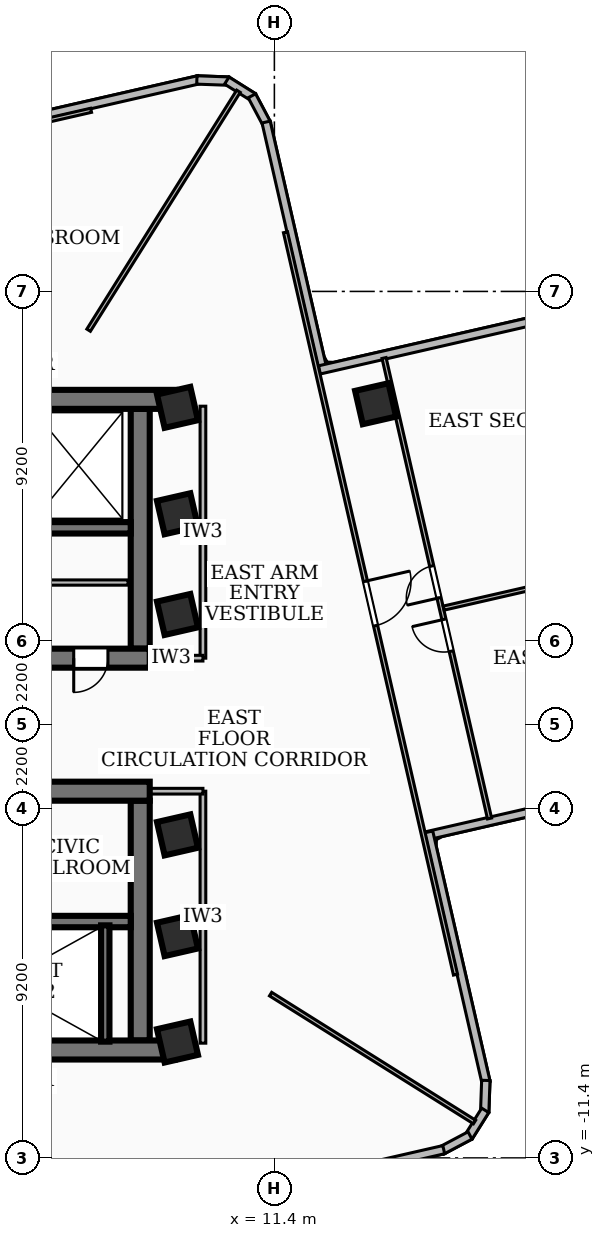
"""IFC4 building model, lengths in metres.
Left out: names, types, materials, properties, quantities, classifications, styles, units other than length and angle.
Written with IfcOpenShell. Run it as: python <this file> out.ifc"""

import sys

from ifc_helpers import new_model, si_unit, direction, frame, frame_2d, origin, origin_2d, place, context, subcontext, project, spatial, rectangle, extrude, element, fill, save


model = new_model("IFC4")
c1 = context("Model", 3, precision=1e-05, world=origin(), true_north=direction((0.0, 1.0)))
c2 = subcontext(c1, "Body", "Model", "MODEL_VIEW")
j1 = project(units=[si_unit("LENGTHUNIT", "METRE"), si_unit("PLANEANGLEUNIT", "RADIAN")], contexts=[c1])
p1 = place(None, origin())
s1 = spatial("IfcSite", under=j1, at=p1, CompositionType="ELEMENT")
p2 = place(p1, origin())
s2 = spatial("IfcBuilding", under=s1, at=p2, CompositionType="ELEMENT")
p3 = place(p2, frame((0.0, 0.0, 119.88)))
s3 = spatial("IfcBuildingStorey", under=s2, at=p3, CompositionType="ELEMENT", Elevation=119.88)
p4 = place(p3, frame((-8.78, 8.56, 0.0), z_axis=(0.0, 0.0, 1.0), x_axis=(1.0, 0.0, 0.0)))
e1 = element("IfcWall", 1, at=p4, inside=s3, PredefinedType="SHEAR", context=c2, shape_type="SweptSolid", body=[
    extrude(rectangle(XDim=17.56, YDim=0.5, at=frame_2d((8.78, 0.0))), origin(), (0.0, 0.0, 1.0), 3.34),
])
p5 = place(p3, frame((8.12, 1.75, 0.0), z_axis=(0.0, 0.0, 1.0), x_axis=(-1.0, 0.0, 0.0)))
e2 = element("IfcWall", 2, at=p5, inside=s3, PredefinedType="SHEAR", context=c2, shape_type="SweptSolid", body=[
    extrude(rectangle(XDim=16.24, YDim=0.5, at=frame_2d((8.12, 0.0))), origin(), (0.0, 0.0, 1.0), 3.34),
])
p6 = place(p5, frame((7.45, 0.0, 0.0)))
e3 = element("IfcOpeningElement", 3, at=p6, cuts=e2, PredefinedType="OPENING", context=c2, shape_type="SweptSolid", body=[
    extrude(rectangle(XDim=1.0, YDim=2.1, at=frame_2d((0.5, 1.05))), frame((0.0, 0.26, 0.0), z_axis=(0.0, -1.0, 0.0), x_axis=(1.0, 0.0, 0.0)), (0.0, 0.0, 1.0), 0.52),
])
p7 = place(p5, frame((3.4, 0.0, 0.0)))
e4 = element("IfcOpeningElement", 4, at=p7, cuts=e2, PredefinedType="OPENING", context=c2, shape_type="SweptSolid", body=[
    extrude(rectangle(XDim=0.9, YDim=2.06, at=frame_2d((0.45, 1.03))), frame((0.0, 0.26, 0.0), z_axis=(0.0, -1.0, 0.0), x_axis=(1.0, 0.0, 0.0)), (0.0, 0.0, 1.0), 0.52),
])
p8 = place(p5, frame((1.1, 0.0, 0.0)))
e5 = element("IfcOpeningElement", 5, at=p8, cuts=e2, PredefinedType="OPENING", context=c2, shape_type="SweptSolid", body=[
    extrude(rectangle(XDim=0.9, YDim=2.06, at=frame_2d((0.45, 1.03))), frame((0.0, 0.26, 0.0), z_axis=(0.0, -1.0, 0.0), x_axis=(1.0, 0.0, 0.0)), (0.0, 0.0, 1.0), 0.52),
])
p9 = place(p3, frame((7.87, 8.31, 0.0), z_axis=(0.0, 0.0, 1.0), x_axis=(0.0, -1.0, 0.0)))
e6 = element("IfcWall", 6, at=p9, inside=s3, PredefinedType="SHEAR", context=c2, shape_type="SweptSolid", body=[
    extrude(rectangle(XDim=6.31, YDim=0.5, at=frame_2d((3.155, 0.0))), origin(), (0.0, 0.0, 1.0), 3.34),
])
p10 = place(p3, frame((7.62, 5.18, 0.0), z_axis=(0.0, 0.0, 1.0), x_axis=(-1.0, 0.0, 0.0)))
e7 = element("IfcWall", 7, at=p10, inside=s3, PredefinedType="SOLIDWALL", context=c2, shape_type="SweptSolid", body=[
    extrude(rectangle(XDim=15.24, YDim=0.3, at=frame_2d((7.62, 0.0))), origin(), (0.0, 0.0, 1.0), 3.34),
])
p11 = place(p10, frame((5.77, 0.0, 0.0)))
e8 = element("IfcOpeningElement", 8, at=p11, cuts=e7, PredefinedType="OPENING", context=c2, shape_type="SweptSolid", body=[
    extrude(rectangle(XDim=1.1, YDim=2.15, at=frame_2d((0.55, 1.075))), frame((0.0, 0.16, 0.0), z_axis=(0.0, -1.0, 0.0), x_axis=(1.0, 0.0, 0.0)), (0.0, 0.0, 1.0), 0.32),
])
p12 = place(p10, frame((2.97, 0.0, 0.0)))
e9 = element("IfcOpeningElement", 9, at=p12, cuts=e7, PredefinedType="OPENING", context=c2, shape_type="SweptSolid", body=[
    extrude(rectangle(XDim=1.1, YDim=2.15, at=frame_2d((0.55, 1.075))), frame((0.0, 0.16, 0.0), z_axis=(0.0, -1.0, 0.0), x_axis=(1.0, 0.0, 0.0)), (0.0, 0.0, 1.0), 0.32),
])
p13 = place(p10, frame((7.97, 0.0, 0.0)))
e10 = element("IfcOpeningElement", 10, at=p13, cuts=e7, PredefinedType="OPENING", context=c2, shape_type="SweptSolid", body=[
    extrude(rectangle(XDim=1.0, YDim=2.1, at=frame_2d((0.5, 1.05))), frame((0.0, 0.16, 0.0), z_axis=(0.0, -1.0, 0.0), x_axis=(1.0, 0.0, 0.0)), (0.0, 0.0, 1.0), 0.32),
])
p14 = place(p3, frame((8.78, -8.56, 0.0), z_axis=(0.0, 0.0, 1.0), x_axis=(-1.0, 0.0, 0.0)))
e11 = element("IfcWall", 11, at=p14, inside=s3, PredefinedType="SHEAR", context=c2, shape_type="SweptSolid", body=[
    extrude(rectangle(XDim=17.56, YDim=0.5, at=frame_2d((8.78, 0.0))), origin(), (0.0, 0.0, 1.0), 3.34),
])
p15 = place(p3, frame((-8.12, -1.75, 0.0), z_axis=(0.0, 0.0, 1.0), x_axis=(1.0, 0.0, 0.0)))
e12 = element("IfcWall", 12, at=p15, inside=s3, PredefinedType="SHEAR", context=c2, shape_type="SweptSolid", body=[
    extrude(rectangle(XDim=16.24, YDim=0.5, at=frame_2d((8.12, 0.0))), origin(), (0.0, 0.0, 1.0), 3.34),
])
p16 = place(p15, frame((7.45, 0.0, 0.0)))
e13 = element("IfcOpeningElement", 13, at=p16, cuts=e12, PredefinedType="OPENING", context=c2, shape_type="SweptSolid", body=[
    extrude(rectangle(XDim=1.0, YDim=2.1, at=frame_2d((0.5, 1.05))), frame((0.0, 0.26, 0.0), z_axis=(0.0, -1.0, 0.0), x_axis=(1.0, 0.0, 0.0)), (0.0, 0.0, 1.0), 0.52),
])
p17 = place(p15, frame((12.65, 0.0, 0.0)))
e14 = element("IfcOpeningElement", 14, at=p17, cuts=e12, PredefinedType="OPENING", context=c2, shape_type="SweptSolid", body=[
    extrude(rectangle(XDim=0.9, YDim=2.06, at=frame_2d((0.45, 1.03))), frame((0.0, 0.26, 0.0), z_axis=(0.0, -1.0, 0.0), x_axis=(1.0, 0.0, 0.0)), (0.0, 0.0, 1.0), 0.52),
])
p18 = place(p15, frame((0.565, 0.0, 0.0)))
e15 = element("IfcOpeningElement", 15, at=p18, cuts=e12, PredefinedType="OPENING", context=c2, shape_type="SweptSolid", body=[
    extrude(rectangle(XDim=1.05, YDim=2.15, at=frame_2d((0.525, 1.075))), frame((0.0, 0.26, 0.0), z_axis=(0.0, -1.0, 0.0), x_axis=(1.0, 0.0, 0.0)), (0.0, 0.0, 1.0), 0.52),
])
p19 = place(p15, frame((2.125, 0.0, 0.0)))
e16 = element("IfcOpeningElement", 16, at=p19, cuts=e12, PredefinedType="OPENING", context=c2, shape_type="SweptSolid", body=[
    extrude(rectangle(XDim=1.05, YDim=2.15, at=frame_2d((0.525, 1.075))), frame((0.0, 0.26, 0.0), z_axis=(0.0, -1.0, 0.0), x_axis=(1.0, 0.0, 0.0)), (0.0, 0.0, 1.0), 0.52),
])
p20 = place(p15, frame((3.685, 0.0, 0.0)))
e17 = element("IfcOpeningElement", 17, at=p20, cuts=e12, PredefinedType="OPENING", context=c2, shape_type="SweptSolid", body=[
    extrude(rectangle(XDim=1.05, YDim=2.15, at=frame_2d((0.525, 1.075))), frame((0.0, 0.26, 0.0), z_axis=(0.0, -1.0, 0.0), x_axis=(1.0, 0.0, 0.0)), (0.0, 0.0, 1.0), 0.52),
])
p21 = place(p3, frame((7.87, -2.0, 0.0), z_axis=(0.0, 0.0, 1.0), x_axis=(0.0, -1.0, 0.0)))
e18 = element("IfcWall", 18, at=p21, inside=s3, PredefinedType="SHEAR", context=c2, shape_type="SweptSolid", body=[
    extrude(rectangle(XDim=6.31, YDim=0.5, at=frame_2d((3.155, 0.0))), origin(), (0.0, 0.0, 1.0), 3.34),
])
p22 = place(p3, frame((-7.62, -5.18, 0.0), z_axis=(0.0, 0.0, 1.0), x_axis=(1.0, 0.0, 0.0)))
e19 = element("IfcWall", 19, at=p22, inside=s3, PredefinedType="SOLIDWALL", context=c2, shape_type="SweptSolid", body=[
    extrude(rectangle(XDim=15.24, YDim=0.3, at=frame_2d((7.62, 0.0))), origin(), (0.0, 0.0, 1.0), 3.34),
])
p23 = place(p22, frame((5.77, 0.0, 0.0)))
e20 = element("IfcOpeningElement", 20, at=p23, cuts=e19, PredefinedType="OPENING", context=c2, shape_type="SweptSolid", body=[
    extrude(rectangle(XDim=1.1, YDim=2.15, at=frame_2d((0.55, 1.075))), frame((0.0, 0.16, 0.0), z_axis=(0.0, -1.0, 0.0), x_axis=(1.0, 0.0, 0.0)), (0.0, 0.0, 1.0), 0.32),
])
p24 = place(p22, frame((7.97, 0.0, 0.0)))
e21 = element("IfcOpeningElement", 21, at=p24, cuts=e19, PredefinedType="OPENING", context=c2, shape_type="SweptSolid", body=[
    extrude(rectangle(XDim=1.0, YDim=2.1, at=frame_2d((0.5, 1.05))), frame((0.0, 0.16, 0.0), z_axis=(0.0, -1.0, 0.0), x_axis=(1.0, 0.0, 0.0)), (0.0, 0.0, 1.0), 0.32),
])
p25 = place(p3, frame((6.95, -8.34, 0.0), z_axis=(0.0, 0.0, 1.0), x_axis=(0.0, 1.0, 0.0)))
e22 = element("IfcWall", 22, at=p25, inside=s3, PredefinedType="SOLIDWALL", context=c2, shape_type="SweptSolid", body=[
    extrude(rectangle(XDim=3.06, YDim=0.22, at=frame_2d((1.53, 0.0))), origin(), (0.0, 0.0, 1.0), 3.34),
])
for number, where, z_axis, x_axis in (
    (23, (8.85, -5.55, 0.0), (0.0, 0.0, 1.0), (0.975, 0.223, 0.0)),
    (24, (8.85, -2.9, 0.0), (0.0, 0.0, 1.0), (0.975, 0.223, 0.0)),
    (25, (8.85, 2.9, 0.0), (0.0, 0.0, 1.0), (0.975, 0.223, 0.0)),
    (26, (8.85, 5.55, 0.0), (0.0, 0.0, 1.0), (0.975, 0.223, 0.0)),
    (27, (8.85, -8.35, 0.0), (0.0, 0.0, 1.0), (0.975, 0.223, 0.0)),
    (28, (8.85, 8.35, 0.0), (0.0, 0.0, 1.0), (0.975, 0.223, 0.0)),
    (29, (14.064, 8.445, 0.0), (0.0, 0.0, 1.0), (0.975, 0.223, 0.0)),
):
    element("IfcColumn", number, at=place(p3, frame(where, z_axis=z_axis, x_axis=x_axis)), inside=s3, PredefinedType="COLUMN", context=c2, shape_type="SweptSolid", body=[
        extrude(rectangle(XDim=0.9, YDim=0.9, at=origin_2d()), origin(), (0.0, 0.0, 1.0), 3.6),
    ])
p26 = place(p3, frame((2.821, 15.46, 0.0), z_axis=(0.0, 0.0, 1.0), x_axis=(0.974754598481, 0.223278912438, 0.0)))
e30 = element("IfcWall", 30, at=p26, inside=s3, PredefinedType="SOLIDWALL", context=c2, shape_type="SweptSolid", body=[
    extrude(rectangle(XDim=6.759, YDim=0.22, at=frame_2d((3.379, 0.0))), origin(), (0.0, 0.0, 1.0), 2.57),
])
p27 = place(p3, frame((9.36, 16.964, 0.0), z_axis=(0.0, 0.0, 1.0), x_axis=(0.999352376715, -0.035983706773, 0.0)))
e31 = element("IfcWall", 31, at=p27, inside=s3, PredefinedType="SOLIDWALL", context=c2, shape_type="SweptSolid", body=[
    extrude(rectangle(XDim=0.834, YDim=0.22, at=frame_2d((0.417, 0.0))), origin(), (0.0, 0.0, 1.0), 3.34),
])
p28 = place(p3, frame((10.148, 16.948, 0.0), z_axis=(0.0, 0.0, 1.0), x_axis=(0.847311109497, -0.531096868492, 0.0)))
e32 = element("IfcWall", 32, at=p28, inside=s3, PredefinedType="SOLIDWALL", context=c2, shape_type="SweptSolid", body=[
    extrude(rectangle(XDim=0.819, YDim=0.22, at=frame_2d((0.41, 0.0))), origin(), (0.0, 0.0, 1.0), 3.34),
])
p29 = place(p3, frame((10.809, 16.548, 0.0), z_axis=(0.0, 0.0, 1.0), x_axis=(0.468506090516, -0.883460266876, 0.0)))
e33 = element("IfcWall", 33, at=p29, inside=s3, PredefinedType="SOLIDWALL", context=c2, shape_type="SweptSolid", body=[
    extrude(rectangle(XDim=0.834, YDim=0.22, at=frame_2d((0.417, 0.0))), origin(), (0.0, 0.0, 1.0), 3.34),
])
p30 = place(p3, frame((11.182, 15.857, 0.0), z_axis=(0.0, 0.0, 1.0), x_axis=(0.223278912438, -0.974754598481, 0.0)))
e34 = element("IfcWall", 34, at=p30, inside=s3, PredefinedType="SOLIDWALL", context=c2, shape_type="SweptSolid", body=[
    extrude(rectangle(XDim=6.759, YDim=0.22, at=frame_2d((3.379, 0.0))), origin(), (0.0, 0.0, 1.0), 3.34),
])
p31 = place(p3, frame((12.585, 9.335, 0.0), z_axis=(0.0, 0.0, 1.0), x_axis=(0.974754036658, 0.223281365141, 0.0)))
e35 = element("IfcWall", 35, at=p31, inside=s3, PredefinedType="SOLIDWALL", context=c2, shape_type="SweptSolid", body=[
    extrude(rectangle(XDim=13.459, YDim=0.22, at=frame_2d((6.729, 0.0))), origin(), (0.0, 0.0, 1.0), 3.34),
])
p32 = place(p31, frame((10.859, 0.0, 0.85)))
e36 = element("IfcOpeningElement", 36, at=p32, cuts=e35, PredefinedType="OPENING", context=c2, shape_type="SweptSolid", body=[
    extrude(rectangle(XDim=1.5, YDim=1.8, at=frame_2d((0.75, 0.9))), frame((0.0, 0.12, 0.0), z_axis=(0.0, -1.0, 0.0), x_axis=(1.0, 0.0, 0.0)), (0.0, 0.0, 1.0), 0.24),
])
p33 = place(p3, frame((28.512, 0.078, 0.0), z_axis=(0.0, 0.0, 1.0), x_axis=(-0.974753462872, -0.223283870038, 0.0)))
e37 = element("IfcWall", 37, at=p33, inside=s3, PredefinedType="SOLIDWALL", context=c2, shape_type="SweptSolid", body=[
    extrude(rectangle(XDim=13.458, YDim=0.22, at=frame_2d((6.729, 0.0))), origin(), (0.0, 0.0, 1.0), 3.34),
])
p34 = place(p33, frame((1.1, 0.0, 0.85)))
e38 = element("IfcOpeningElement", 38, at=p34, cuts=e37, PredefinedType="OPENING", context=c2, shape_type="SweptSolid", body=[
    extrude(rectangle(XDim=2.1, YDim=1.8, at=frame_2d((1.05, 0.9))), frame((0.0, 0.12, 0.0), z_axis=(0.0, -1.0, 0.0), x_axis=(1.0, 0.0, 0.0)), (0.0, 0.0, 1.0), 0.24),
])
p35 = place(p3, frame((15.46, -2.821, 0.0), z_axis=(0.0, 0.0, 1.0), x_axis=(0.223278912438, -0.974754598481, 0.0)))
e39 = element("IfcWall", 39, at=p35, inside=s3, PredefinedType="SOLIDWALL", context=c2, shape_type="SweptSolid", body=[
    extrude(rectangle(XDim=6.759, YDim=0.22, at=frame_2d((3.379, 0.0))), origin(), (0.0, 0.0, 1.0), 3.34),
])
p36 = place(p3, frame((16.964, -9.36, 0.0), z_axis=(0.0, 0.0, 1.0), x_axis=(-0.035983706773, -0.999352376715, 0.0)))
e40 = element("IfcWall", 40, at=p36, inside=s3, PredefinedType="SOLIDWALL", context=c2, shape_type="SweptSolid", body=[
    extrude(rectangle(XDim=0.834, YDim=0.22, at=frame_2d((0.417, 0.0))), origin(), (0.0, 0.0, 1.0), 3.34),
])
p37 = place(p3, frame((16.948, -10.148, 0.0), z_axis=(0.0, 0.0, 1.0), x_axis=(-0.531096868492, -0.847311109497, 0.0)))
e41 = element("IfcWall", 41, at=p37, inside=s3, PredefinedType="SOLIDWALL", context=c2, shape_type="SweptSolid", body=[
    extrude(rectangle(XDim=0.819, YDim=0.22, at=frame_2d((0.41, 0.0))), origin(), (0.0, 0.0, 1.0), 3.34),
])
p38 = place(p3, frame((16.548, -10.809, 0.0), z_axis=(0.0, 0.0, 1.0), x_axis=(-0.883460266876, -0.468506090516, 0.0)))
e42 = element("IfcWall", 42, at=p38, inside=s3, PredefinedType="SOLIDWALL", context=c2, shape_type="SweptSolid", body=[
    extrude(rectangle(XDim=0.834, YDim=0.22, at=frame_2d((0.417, 0.0))), origin(), (0.0, 0.0, 1.0), 3.34),
])
p39 = place(p3, frame((15.857, -11.182, 0.0), z_axis=(0.0, 0.0, 1.0), x_axis=(-0.974754598481, -0.223278912438, 0.0)))
e43 = element("IfcWall", 43, at=p39, inside=s3, PredefinedType="SOLIDWALL", context=c2, shape_type="SweptSolid", body=[
    extrude(rectangle(XDim=6.759, YDim=0.22, at=frame_2d((3.379, 0.0))), origin(), (0.0, 0.0, 1.0), 3.34),
])
p40 = place(p3, frame((2.9, 3.74, 0.0), z_axis=(0.0, 0.0, 1.0), x_axis=(1.0, 0.0, 0.0)))
e44 = element("IfcWall", 44, at=p40, inside=s3, PredefinedType="PARTITIONING", context=c2, shape_type="SweptSolid", body=[
    extrude(rectangle(XDim=4.65, YDim=0.138, at=frame_2d((2.325, 0.0))), origin(), (0.0, 0.0, 1.0), 3.34),
])
p41 = place(p3, frame((9.52, 1.75, 0.0), z_axis=(0.0, 0.0, 1.0), x_axis=(0.0, 1.0, 0.0)))
e45 = element("IfcWall", 45, at=p41, inside=s3, PredefinedType="PARTITIONING", context=c2, shape_type="SweptSolid", body=[
    extrude(rectangle(XDim=6.63, YDim=0.15, at=frame_2d((3.315, 0.0))), origin(), (0.0, 0.0, 1.0), 2.57),
])
p42 = place(p3, frame((7.85, 1.75, 0.0), z_axis=(0.0, 0.0, 1.0), x_axis=(1.0, 0.0, 0.0)))
e46 = element("IfcWall", 46, at=p42, inside=s3, PredefinedType="PARTITIONING", context=c2, shape_type="SweptSolid", body=[
    extrude(rectangle(XDim=1.67, YDim=0.15, at=frame_2d((0.835, 0.0))), origin(), (0.0, 0.0, 1.0), 2.57),
])
p43 = place(p3, frame((9.52, -8.38, 0.0), z_axis=(0.0, 0.0, 1.0), x_axis=(0.0, 1.0, 0.0)))
e47 = element("IfcWall", 47, at=p43, inside=s3, PredefinedType="PARTITIONING", context=c2, shape_type="SweptSolid", body=[
    extrude(rectangle(XDim=6.63, YDim=0.15, at=frame_2d((3.315, 0.0))), origin(), (0.0, 0.0, 1.0), 2.57),
])
p44 = place(p3, frame((7.85, -1.75, 0.0), z_axis=(0.0, 0.0, 1.0), x_axis=(1.0, 0.0, 0.0)))
e48 = element("IfcWall", 48, at=p44, inside=s3, PredefinedType="PARTITIONING", context=c2, shape_type="SweptSolid", body=[
    extrude(rectangle(XDim=1.67, YDim=0.15, at=frame_2d((0.835, 0.0))), origin(), (0.0, 0.0, 1.0), 2.57),
])
p45 = place(p3, frame((6.512, 10.38, 0.0), z_axis=(0.0, 0.0, 1.0), x_axis=(0.531323053356, 0.847169294163, 0.0)))
e49 = element("IfcWall", 49, at=p45, inside=s3, PredefinedType="PARTITIONING", context=c2, shape_type="SweptSolid", body=[
    extrude(rectangle(XDim=7.421, YDim=0.11, at=frame_2d((3.711, 0.0))), origin(), (0.0, 0.0, 1.0), 2.57),
])
p46 = place(p3, frame((11.3, -7.089, 0.0), z_axis=(0.0, 0.0, 1.0), x_axis=(0.847172398776, -0.531318103167, 0.0)))
e50 = element("IfcWall", 50, at=p46, inside=s3, PredefinedType="PARTITIONING", context=c2, shape_type="SweptSolid", body=[
    extrude(rectangle(XDim=6.335, YDim=0.11, at=frame_2d((3.167, 0.0))), origin(), (0.0, 0.0, 1.0), 3.34),
])
p47 = place(p3, frame((11.692, 12.957, 0.0), z_axis=(0.0, 0.0, 1.0), x_axis=(0.223262093598, -0.97475845088, 0.0)))
e51 = element("IfcWall", 51, at=p47, inside=s3, PredefinedType="PARTITIONING", context=c2, shape_type="SweptSolid", body=[
    extrude(rectangle(XDim=20.04, YDim=0.11, at=frame_2d((10.02, 0.0))), origin(), (0.0, 0.0, 1.0), 2.57),
])
p48 = place(p47, frame((9.42, 0.0, 0.0)))
e52 = element("IfcOpeningElement", 52, at=p48, cuts=e51, PredefinedType="OPENING", context=c2, shape_type="SweptSolid", body=[
    extrude(rectangle(XDim=1.2, YDim=2.1, at=frame_2d((0.6, 1.05))), frame((0.0, 0.065, 0.0), z_axis=(0.0, -1.0, 0.0), x_axis=(1.0, 0.0, 0.0)), (0.0, 0.0, 1.0), 0.13),
])
p49 = place(p3, frame((15.855, 3.067, 0.0), z_axis=(0.0, 0.0, 1.0), x_axis=(0.974758398925, 0.223262320434, 0.0)))
e53 = element("IfcWall", 53, at=p49, inside=s3, PredefinedType="PARTITIONING", context=c2, shape_type="SweptSolid", body=[
    extrude(rectangle(XDim=13.075, YDim=0.11, at=frame_2d((6.538, 0.0))), origin(), (0.0, 0.0, 1.0), 2.72),
])
p50 = place(p3, frame((17.062, -2.468, 0.0), z_axis=(0.0, 0.0, 1.0), x_axis=(-0.223341555051, 0.974740247341, 0.0)))
e54 = element("IfcWall", 54, at=p50, inside=s3, PredefinedType="PARTITIONING", context=c2, shape_type="SweptSolid", body=[
    extrude(rectangle(XDim=12.43, YDim=0.11, at=frame_2d((6.215, 0.0))), origin(), (0.0, 0.0, 1.0), 2.57),
])
p51 = place(p50, frame((4.515, 0.0, 0.0)))
e55 = element("IfcOpeningElement", 55, at=p51, cuts=e54, PredefinedType="OPENING", context=c2, shape_type="SweptSolid", body=[
    extrude(rectangle(XDim=0.86, YDim=2.04, at=frame_2d((0.43, 1.02))), frame((0.0, 0.065, 0.0), z_axis=(0.0, -1.0, 0.0), x_axis=(1.0, 0.0, 0.0)), (0.0, 0.0, 1.0), 0.13),
])
p52 = place(p50, frame((5.955, 0.0, 0.0)))
e56 = element("IfcOpeningElement", 56, at=p52, cuts=e54, PredefinedType="OPENING", context=c2, shape_type="SweptSolid", body=[
    extrude(rectangle(XDim=0.86, YDim=2.04, at=frame_2d((0.43, 1.02))), frame((0.0, 0.065, 0.0), z_axis=(0.0, -1.0, 0.0), x_axis=(1.0, 0.0, 0.0)), (0.0, 0.0, 1.0), 0.13),
])
p53 = place(p3, frame((-12.957, 11.692, 0.0), z_axis=(0.0, 0.0, 1.0), x_axis=(0.97475845088, 0.223262093598, 0.0)))
e57 = element("IfcWall", 57, at=p53, inside=s3, PredefinedType="PARTITIONING", context=c2, shape_type="SweptSolid", body=[
    extrude(rectangle(XDim=20.04, YDim=0.11, at=frame_2d((10.02, 0.0))), origin(), (0.0, 0.0, 1.0), 2.57),
])
p54 = place(p53, frame((9.42, 0.0, 0.0)))
e58 = element("IfcOpeningElement", 58, at=p54, cuts=e57, PredefinedType="OPENING", context=c2, shape_type="SweptSolid", body=[
    extrude(rectangle(XDim=1.2, YDim=2.1, at=frame_2d((0.6, 1.05))), frame((0.0, 0.065, 0.0), z_axis=(0.0, -1.0, 0.0), x_axis=(1.0, 0.0, 0.0)), (0.0, 0.0, 1.0), 0.13),
])
p55 = place(p8, origin())
e59 = element("IfcDoor", 59, at=p55, inside=s3, OperationType="SINGLE_SWING_RIGHT", PredefinedType="DOOR", context=c2, shape_type="SweptSolid", body=[
    extrude(rectangle(XDim=0.9, YDim=2.06, at=frame_2d((0.45, 1.03))), frame((0.0, 0.025, 0.0), z_axis=(0.0, -1.0, 0.0), x_axis=(1.0, 0.0, 0.0)), (0.0, 0.0, 1.0), 0.05),
])
fill(e5, e59)
p56 = place(p48, origin())
e60 = element("IfcDoor", 60, at=p56, inside=s3, OperationType="SINGLE_SWING_LEFT", PredefinedType="DOOR", context=c2, shape_type="SweptSolid", body=[
    extrude(rectangle(XDim=1.2, YDim=2.1, at=frame_2d((0.6, 1.05))), frame((0.0, 0.025, 0.0), z_axis=(0.0, -1.0, 0.0), x_axis=(1.0, 0.0, 0.0)), (0.0, 0.0, 1.0), 0.05),
])
fill(e52, e60)
p57 = place(p51, origin())
e61 = element("IfcDoor", 61, at=p57, inside=s3, OperationType="SINGLE_SWING_RIGHT", PredefinedType="DOOR", context=c2, shape_type="SweptSolid", body=[
    extrude(rectangle(XDim=0.86, YDim=2.04, at=frame_2d((0.43, 1.02))), frame((0.0, 0.025, 0.0), z_axis=(0.0, -1.0, 0.0), x_axis=(1.0, 0.0, 0.0)), (0.0, 0.0, 1.0), 0.05),
])
fill(e55, e61)
p58 = place(p52, origin())
e62 = element("IfcDoor", 62, at=p58, inside=s3, OperationType="SINGLE_SWING_LEFT", PredefinedType="DOOR", context=c2, shape_type="SweptSolid", body=[
    extrude(rectangle(XDim=0.86, YDim=2.04, at=frame_2d((0.43, 1.02))), frame((0.0, 0.025, 0.0), z_axis=(0.0, -1.0, 0.0), x_axis=(1.0, 0.0, 0.0)), (0.0, 0.0, 1.0), 0.05),
])
fill(e56, e62)
save(model, sys.argv[1])
